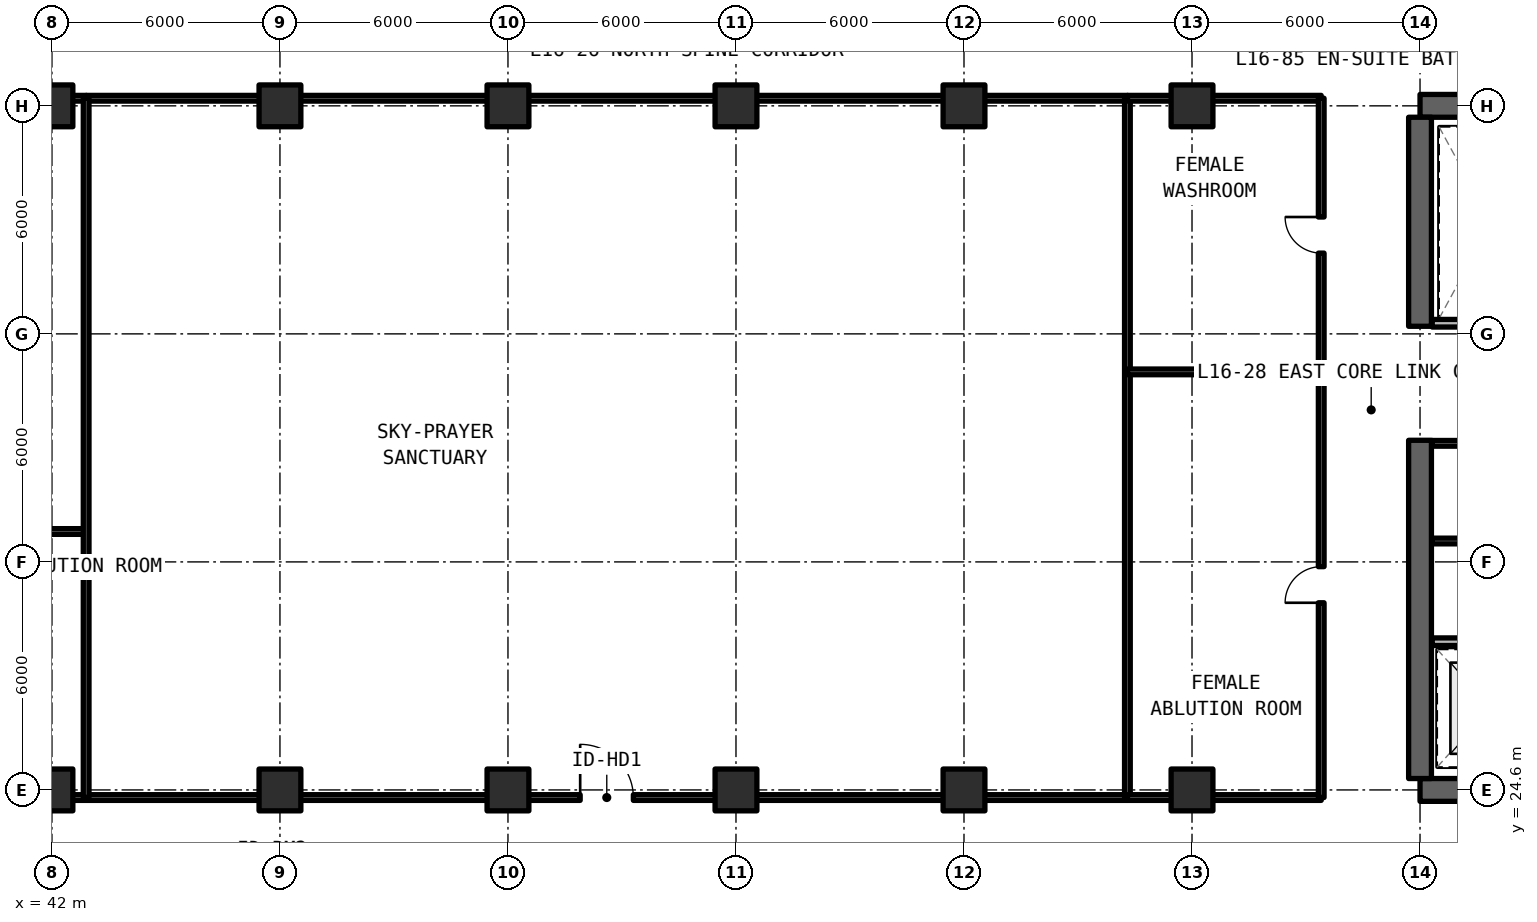
"""IFC4 building model, lengths in metres.
Left out: names, types, materials, properties, quantities, classifications, styles, units other than length and angle.
Written with IfcOpenShell. Run it as: python <this file> out.ifc"""

import sys

from ifc_helpers import new_model, si_unit, direction, frame, frame_2d, origin, origin_2d, place, context, subcontext, project, spatial, rectangle, extrude, element, fill, save


model = new_model("IFC4")
c1 = context("Model", 3, precision=1e-05, world=origin(), true_north=direction((0.0, 1.0)))
c2 = subcontext(c1, "Body", "Model", "MODEL_VIEW")
j1 = project(units=[si_unit("LENGTHUNIT", "METRE"), si_unit("PLANEANGLEUNIT", "RADIAN")], contexts=[c1])
p1 = place(None, origin())
s1 = spatial("IfcSite", under=j1, at=p1, CompositionType="ELEMENT")
p2 = place(p1, origin())
s2 = spatial("IfcBuilding", under=s1, at=p2, CompositionType="ELEMENT")
p3 = place(p2, frame((0.0, 0.0, 58.74)))
s3 = spatial("IfcBuildingStorey", under=s2, at=p3, CompositionType="ELEMENT", Elevation=58.74)
for number, where, z_axis, x_axis in (
    (1, (78.0, 24.6, 0.0), (0.0, 0.0, 1.0), (1.0, 0.0, 0.0)),
    (2, (90.0, 42.6, 0.0), (0.0, 0.0, 1.0), (-1.0, 0.0, 0.0)),
):
    element("IfcWall", number, at=place(p3, frame(where, z_axis=z_axis, x_axis=x_axis)), inside=s3, PredefinedType="SHEAR", context=c2, shape_type="SweptSolid", body=[
        extrude(rectangle(XDim=12.0, YDim=0.6, at=frame_2d((6.0, 0.0))), origin(), (0.0, 0.0, 1.0), 3.63),
    ])
p4 = place(p3, frame((78.0, 24.9, 0.0), z_axis=(0.0, 0.0, 1.0), x_axis=(0.0, 1.0, 0.0)))
e3 = element("IfcWall", 3, at=p4, inside=s3, PredefinedType="SHEAR", context=c2, shape_type="SweptSolid", body=[
    extrude(rectangle(XDim=8.9, YDim=0.6, at=frame_2d((4.45, 0.0))), origin(), (0.0, 0.0, 1.0), 3.63),
])
p5 = place(p3, frame((78.0, 36.8, 0.0), z_axis=(0.0, 0.0, 1.0), x_axis=(0.0, 1.0, 0.0)))
e4 = element("IfcWall", 4, at=p5, inside=s3, PredefinedType="SHEAR", context=c2, shape_type="SweptSolid", body=[
    extrude(rectangle(XDim=5.5, YDim=0.6, at=frame_2d((2.75, 0.0))), origin(), (0.0, 0.0, 1.0), 3.63),
])
for number, where, z_axis, x_axis in (
    (5, (42.0, 24.6, 0.0), (0.0, 0.0, 1.0), (1.0, 0.0, 0.0)),
    (6, (42.0, 42.6, 0.0), (0.0, 0.0, 1.0), (1.0, 0.0, 0.0)),
    (7, (48.0, 24.6, 0.0), (0.0, 0.0, 1.0), (1.0, 0.0, 0.0)),
    (8, (48.0, 42.6, 0.0), (0.0, 0.0, 1.0), (1.0, 0.0, 0.0)),
    (9, (54.0, 24.6, 0.0), (0.0, 0.0, 1.0), (1.0, 0.0, 0.0)),
    (10, (54.0, 42.6, 0.0), (0.0, 0.0, 1.0), (1.0, 0.0, 0.0)),
    (11, (60.0, 24.6, 0.0), (0.0, 0.0, 1.0), (1.0, 0.0, 0.0)),
    (12, (60.0, 42.6, 0.0), (0.0, 0.0, 1.0), (1.0, 0.0, 0.0)),
    (13, (66.0, 24.6, 0.0), (0.0, 0.0, 1.0), (1.0, 0.0, 0.0)),
    (14, (66.0, 42.6, 0.0), (0.0, 0.0, 1.0), (1.0, 0.0, 0.0)),
    (15, (72.0, 24.6, 0.0), (0.0, 0.0, 1.0), (1.0, 0.0, 0.0)),
    (16, (72.0, 42.6, 0.0), (0.0, 0.0, 1.0), (1.0, 0.0, 0.0)),
):
    element("IfcColumn", number, at=place(p3, frame(where, z_axis=z_axis, x_axis=x_axis)), inside=s3, PredefinedType="COLUMN", context=c2, shape_type="SweptSolid", body=[
        extrude(rectangle(XDim=1.1, YDim=1.1, at=origin_2d()), origin(), (0.0, 0.0, 1.0), 3.63),
    ])
p6 = place(p3, frame((78.32, 28.5, 0.0), z_axis=(0.0, 0.0, 1.0), x_axis=(1.0, 0.0, 0.0)))
e17 = element("IfcWall", 17, at=p6, inside=s3, PredefinedType="SOLIDWALL", context=c2, shape_type="SweptSolid", body=[
    extrude(rectangle(XDim=7.36, YDim=0.2, at=frame_2d((3.68, 0.0))), origin(), (0.0, 0.0, 1.0), 2.63),
])
p7 = place(p6, frame((3.48, 0.0, 0.0)))
e18 = element("IfcOpeningElement", 18, at=p7, cuts=e17, PredefinedType="OPENING", context=c2, shape_type="SweptSolid", body=[
    extrude(rectangle(XDim=1.0, YDim=2.15, at=frame_2d((0.5, 1.075))), frame((0.0, 0.11, 0.0), z_axis=(0.0, -1.0, 0.0), x_axis=(1.0, 0.0, 0.0)), (0.0, 0.0, 1.0), 0.22),
])
for number, where, z_axis, x_axis in (
    (19, (78.32, 31.15, 0.0), (0.0, 0.0, 1.0), (1.0, 0.0, 0.0)),
    (20, (78.32, 33.72, 0.0), (0.0, 0.0, 1.0), (1.0, 0.0, 0.0)),
):
    element("IfcWall", number, at=place(p3, frame(where, z_axis=z_axis, x_axis=x_axis)), inside=s3, PredefinedType="SOLIDWALL", context=c2, shape_type="SweptSolid", body=[
        extrude(rectangle(XDim=3.0, YDim=0.15, at=frame_2d((1.5, 0.0))), origin(), (0.0, 0.0, 1.0), 2.63),
    ])
p8 = place(p3, frame((78.32, 36.88, 0.0), z_axis=(0.0, 0.0, 1.0), x_axis=(1.0, 0.0, 0.0)))
e21 = element("IfcWall", 21, at=p8, inside=s3, PredefinedType="SOLIDWALL", context=c2, shape_type="SweptSolid", body=[
    extrude(rectangle(XDim=3.0, YDim=0.2, at=frame_2d((1.5, 0.0))), origin(), (0.0, 0.0, 1.0), 2.63),
])
p9 = place(p3, frame((38.6, 24.4, 0.0), z_axis=(0.0, 0.0, 1.0), x_axis=(1.0, 0.0, 0.0)))
e22 = element("IfcWall", 22, at=p9, inside=s3, PredefinedType="SOLIDWALL", context=c2, shape_type="SweptSolid", body=[
    extrude(rectangle(XDim=4.3, YDim=0.15, at=frame_2d((2.15, 0.0))), origin(), (0.0, 0.0, 1.0), 2.625),
])
p10 = place(p3, frame((38.6, 31.4, 0.0), z_axis=(0.0, 0.0, 1.0), x_axis=(1.0, 0.0, 0.0)))
e23 = element("IfcWall", 23, at=p10, inside=s3, PredefinedType="SOLIDWALL", context=c2, shape_type="SweptSolid", body=[
    extrude(rectangle(XDim=4.3, YDim=0.15, at=frame_2d((2.15, 0.0))), origin(), (0.0, 0.0, 1.0), 2.63),
])
p11 = place(p3, frame((38.6, 42.8, 0.0), z_axis=(0.0, 0.0, 1.0), x_axis=(1.0, 0.0, 0.0)))
e24 = element("IfcWall", 24, at=p11, inside=s3, PredefinedType="SOLIDWALL", context=c2, shape_type="SweptSolid", body=[
    extrude(rectangle(XDim=4.3, YDim=0.15, at=frame_2d((2.15, 0.0))), origin(), (0.0, 0.0, 1.0), 2.625),
])
p12 = place(p3, frame((42.9, 24.4, 0.0), z_axis=(0.0, 0.0, 1.0), x_axis=(1.0, 0.0, 0.0)))
e25 = element("IfcWall", 25, at=p12, inside=s3, PredefinedType="SOLIDWALL", context=c2, shape_type="SweptSolid", body=[
    extrude(rectangle(XDim=27.4, YDim=0.15, at=frame_2d((13.7, 0.0))), origin(), (0.0, 0.0, 1.0), 2.625),
])
p13 = place(p12, frame((13.0, 0.0, 0.0)))
e26 = element("IfcOpeningElement", 26, at=p13, cuts=e25, PredefinedType="OPENING", context=c2, shape_type="SweptSolid", body=[
    extrude(rectangle(XDim=1.4, YDim=2.15, at=frame_2d((0.7, 1.075))), frame((0.0, 0.085, 0.0), z_axis=(0.0, -1.0, 0.0), x_axis=(1.0, 0.0, 0.0)), (0.0, 0.0, 1.0), 0.17),
])
p14 = place(p3, frame((42.9, 42.8, 0.0), z_axis=(0.0, 0.0, 1.0), x_axis=(1.0, 0.0, 0.0)))
e27 = element("IfcWall", 27, at=p14, inside=s3, PredefinedType="SOLIDWALL", context=c2, shape_type="SweptSolid", body=[
    extrude(rectangle(XDim=27.4, YDim=0.15, at=frame_2d((13.7, 0.0))), origin(), (0.0, 0.0, 1.0), 2.625),
])
for number, where, z_axis, x_axis in (
    (28, (42.9, 24.4, 0.0), (0.0, 0.0, 1.0), (0.0, 1.0, 0.0)),
    (29, (70.3, 24.4, 0.0), (0.0, 0.0, 1.0), (0.0, 1.0, 0.0)),
):
    element("IfcWall", number, at=place(p3, frame(where, z_axis=z_axis, x_axis=x_axis)), inside=s3, PredefinedType="SOLIDWALL", context=c2, shape_type="SweptSolid", body=[
        extrude(rectangle(XDim=18.4, YDim=0.15, at=frame_2d((9.2, 0.0))), origin(), (0.0, 0.0, 1.0), 2.63),
    ])
p15 = place(p3, frame((70.3, 24.4, 0.0), z_axis=(0.0, 0.0, 1.0), x_axis=(1.0, 0.0, 0.0)))
e30 = element("IfcWall", 30, at=p15, inside=s3, PredefinedType="SOLIDWALL", context=c2, shape_type="SweptSolid", body=[
    extrude(rectangle(XDim=5.1, YDim=0.15, at=frame_2d((2.55, 0.0))), origin(), (0.0, 0.0, 1.0), 2.625),
])
p16 = place(p3, frame((70.3, 35.6, 0.0), z_axis=(0.0, 0.0, 1.0), x_axis=(1.0, 0.0, 0.0)))
e31 = element("IfcWall", 31, at=p16, inside=s3, PredefinedType="SOLIDWALL", context=c2, shape_type="SweptSolid", body=[
    extrude(rectangle(XDim=5.1, YDim=0.15, at=frame_2d((2.55, 0.0))), origin(), (0.0, 0.0, 1.0), 2.63),
])
p17 = place(p3, frame((75.4, 24.4, 0.0), z_axis=(0.0, 0.0, 1.0), x_axis=(0.0, 1.0, 0.0)))
e32 = element("IfcWall", 32, at=p17, inside=s3, PredefinedType="SOLIDWALL", context=c2, shape_type="SweptSolid", body=[
    extrude(rectangle(XDim=11.2, YDim=0.15, at=frame_2d((5.6, 0.0))), origin(), (0.0, 0.0, 1.0), 2.63),
])
p18 = place(p17, frame((5.125, 0.0, 0.0)))
e33 = element("IfcOpeningElement", 33, at=p18, cuts=e32, PredefinedType="OPENING", context=c2, shape_type="SweptSolid", body=[
    extrude(rectangle(XDim=0.95, YDim=2.15, at=frame_2d((0.475, 1.075))), frame((0.0, 0.085, 0.0), z_axis=(0.0, -1.0, 0.0), x_axis=(1.0, 0.0, 0.0)), (0.0, 0.0, 1.0), 0.17),
])
p19 = place(p3, frame((70.3, 42.8, 0.0), z_axis=(0.0, 0.0, 1.0), x_axis=(1.0, 0.0, 0.0)))
e34 = element("IfcWall", 34, at=p19, inside=s3, PredefinedType="SOLIDWALL", context=c2, shape_type="SweptSolid", body=[
    extrude(rectangle(XDim=5.1, YDim=0.15, at=frame_2d((2.55, 0.0))), origin(), (0.0, 0.0, 1.0), 2.625),
])
p20 = place(p3, frame((75.4, 35.6, 0.0), z_axis=(0.0, 0.0, 1.0), x_axis=(0.0, 1.0, 0.0)))
e35 = element("IfcWall", 35, at=p20, inside=s3, PredefinedType="SOLIDWALL", context=c2, shape_type="SweptSolid", body=[
    extrude(rectangle(XDim=7.2, YDim=0.15, at=frame_2d((3.6, 0.0))), origin(), (0.0, 0.0, 1.0), 2.63),
])
p21 = place(p20, frame((3.125, 0.0, 0.0)))
e36 = element("IfcOpeningElement", 36, at=p21, cuts=e35, PredefinedType="OPENING", context=c2, shape_type="SweptSolid", body=[
    extrude(rectangle(XDim=0.95, YDim=2.15, at=frame_2d((0.475, 1.075))), frame((0.0, 0.085, 0.0), z_axis=(0.0, -1.0, 0.0), x_axis=(1.0, 0.0, 0.0)), (0.0, 0.0, 1.0), 0.17),
])
p22 = place(p13, origin())
e37 = element("IfcDoor", 37, at=p22, inside=s3, OperationType="SINGLE_SWING_RIGHT", PredefinedType="DOOR", context=c2, shape_type="SweptSolid", body=[
    extrude(rectangle(XDim=1.4, YDim=2.15, at=frame_2d((0.7, 1.075))), frame((0.0, 0.025, 0.0), z_axis=(0.0, -1.0, 0.0), x_axis=(1.0, 0.0, 0.0)), (0.0, 0.0, 1.0), 0.05),
])
fill(e26, e37)
p23 = place(p18, origin())
e38 = element("IfcDoor", 38, at=p23, inside=s3, OperationType="SINGLE_SWING_LEFT", PredefinedType="DOOR", context=c2, shape_type="SweptSolid", body=[
    extrude(rectangle(XDim=0.95, YDim=2.15, at=frame_2d((0.475, 1.075))), frame((0.0, 0.025, 0.0), z_axis=(0.0, -1.0, 0.0), x_axis=(1.0, 0.0, 0.0)), (0.0, 0.0, 1.0), 0.05),
])
fill(e33, e38)
p24 = place(p21, origin())
e39 = element("IfcDoor", 39, at=p24, inside=s3, OperationType="SINGLE_SWING_RIGHT", PredefinedType="DOOR", context=c2, shape_type="SweptSolid", body=[
    extrude(rectangle(XDim=0.95, YDim=2.15, at=frame_2d((0.475, 1.075))), frame((0.0, 0.025, 0.0), z_axis=(0.0, -1.0, 0.0), x_axis=(1.0, 0.0, 0.0)), (0.0, 0.0, 1.0), 0.05),
])
fill(e36, e39)
save(model, sys.argv[1])
